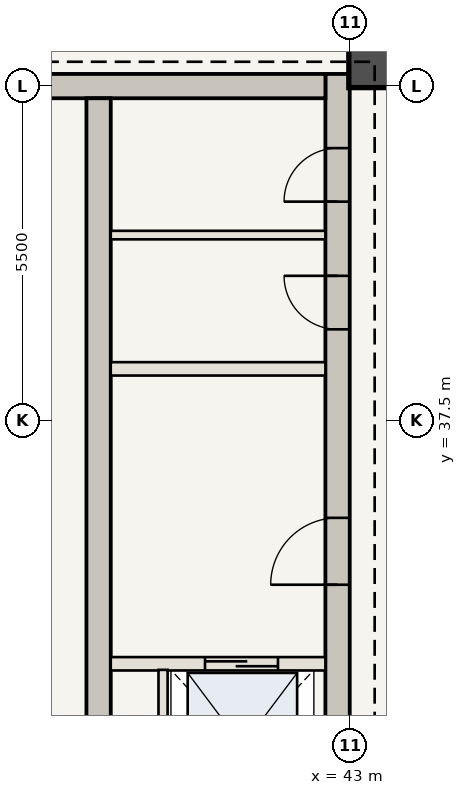
"""IFC4 building model, lengths in metres.
Left out: names, types, materials, properties, quantities, classifications, styles, units other than length and angle.
Written with IfcOpenShell. Run it as: python <this file> out.ifc"""

import sys

from ifc_helpers import new_model, si_unit, direction, frame, frame_2d, origin, origin_2d, place, context, subcontext, project, spatial, rectangle, extrude, element, fill, save


model = new_model("IFC4")
c1 = context("Model", 3, precision=1e-05, world=origin(), true_north=direction((0.0, 1.0)))
c2 = subcontext(c1, "Body", "Model", "MODEL_VIEW")
j1 = project(units=[si_unit("LENGTHUNIT", "METRE"), si_unit("PLANEANGLEUNIT", "RADIAN")], contexts=[c1])
p1 = place(None, origin())
s1 = spatial("IfcSite", under=j1, at=p1, CompositionType="ELEMENT")
p2 = place(p1, origin())
s2 = spatial("IfcBuilding", under=s1, at=p2, CompositionType="ELEMENT")
p3 = place(p2, frame((0.0, 0.0, 285.25)))
s3 = spatial("IfcBuildingStorey", under=s2, at=p3, CompositionType="ELEMENT", Elevation=285.25)
p4 = place(p3, frame((42.79, 30.6, 0.0), z_axis=(0.0, 0.0, 1.0), x_axis=(0.0, 1.0, 0.0)))
e1 = element("IfcWall", 1, at=p4, inside=s3, PredefinedType="SHEAR", context=c2, shape_type="SweptSolid", body=[
    extrude(rectangle(XDim=12.6, YDim=0.4, at=frame_2d((6.3, 0.0))), origin(), (0.0, 0.0, 1.0), 3.85),
])
p5 = place(p4, frame((4.2, 0.0, 0.0)))
e2 = element("IfcOpeningElement", 2, at=p5, cuts=e1, PredefinedType="OPENING", context=c2, shape_type="SweptSolid", body=[
    extrude(rectangle(XDim=1.1, YDim=2.15, at=frame_2d((0.55, 1.075))), frame((0.0, 0.21, 0.0), z_axis=(0.0, -1.0, 0.0), x_axis=(1.0, 0.0, 0.0)), (0.0, 0.0, 1.0), 0.42),
])
p6 = place(p4, frame((8.4, 0.0, 0.0)))
e3 = element("IfcOpeningElement", 3, at=p6, cuts=e1, PredefinedType="OPENING", context=c2, shape_type="SweptSolid", body=[
    extrude(rectangle(XDim=0.88, YDim=2.1, at=frame_2d((0.44, 1.05))), frame((0.0, 0.21, 0.0), z_axis=(0.0, -1.0, 0.0), x_axis=(1.0, 0.0, 0.0)), (0.0, 0.0, 1.0), 0.42),
])
p7 = place(p4, frame((10.5, 0.0, 0.0)))
e4 = element("IfcOpeningElement", 4, at=p7, cuts=e1, PredefinedType="OPENING", context=c2, shape_type="SweptSolid", body=[
    extrude(rectangle(XDim=0.88, YDim=2.1, at=frame_2d((0.44, 1.05))), frame((0.0, 0.21, 0.0), z_axis=(0.0, -1.0, 0.0), x_axis=(1.0, 0.0, 0.0)), (0.0, 0.0, 1.0), 0.42),
])
p8 = place(p3, frame((37.75, 43.0, 0.0), z_axis=(0.0, 0.0, 1.0), x_axis=(1.0, 0.0, 0.0)))
e5 = element("IfcWall", 5, at=p8, inside=s3, PredefinedType="SHEAR", context=c2, shape_type="SweptSolid", body=[
    extrude(rectangle(XDim=4.84, YDim=0.4, at=frame_2d((2.42, 0.0))), origin(), (0.0, 0.0, 1.0), 3.85),
])
p9 = place(p3, frame((38.86, 30.6, 0.0), z_axis=(0.0, 0.0, 1.0), x_axis=(0.0, 1.0, 0.0)))
e6 = element("IfcWall", 6, at=p9, inside=s3, PredefinedType="SHEAR", context=c2, shape_type="SweptSolid", body=[
    extrude(rectangle(XDim=12.2, YDim=0.4, at=frame_2d((6.1, 0.0))), origin(), (0.0, 0.0, 1.0), 3.85),
])
p10 = place(p3, frame((43.35, 43.35, 0.0), z_axis=(0.0, 0.0, 1.0), x_axis=(1.0, 0.0, 0.0)))
e7 = element("IfcColumn", 7, at=p10, inside=s3, PredefinedType="COLUMN", context=c2, shape_type="SweptSolid", body=[
    extrude(rectangle(XDim=0.75, YDim=0.75, at=origin_2d()), origin(), (0.0, 0.0, 1.0), 3.85),
])
p11 = place(p3, frame((39.06, 33.5, 0.0), z_axis=(0.0, 0.0, 1.0), x_axis=(1.0, 0.0, 0.0)))
e8 = element("IfcWall", 8, at=p11, inside=s3, PredefinedType="STANDARD", context=c2, shape_type="SweptSolid", body=[
    extrude(rectangle(XDim=3.53, YDim=0.22, at=frame_2d((1.765, 0.0))), origin(), (0.0, 0.0, 1.0), 3.685),
])
p12 = place(p11, frame((1.55, 0.0, 0.0)))
e9 = element("IfcOpeningElement", 9, at=p12, cuts=e8, PredefinedType="OPENING", context=c2, shape_type="SweptSolid", body=[
    extrude(rectangle(XDim=1.2, YDim=2.2, at=frame_2d((0.6, 1.1))), frame((0.0, 0.12, 0.0), z_axis=(0.0, -1.0, 0.0), x_axis=(1.0, 0.0, 0.0)), (0.0, 0.0, 1.0), 0.24),
])
p13 = place(p3, frame((39.92, 30.75, 0.0), z_axis=(0.0, 0.0, 1.0), x_axis=(0.0, 1.0, 0.0)))
e10 = element("IfcWall", 10, at=p13, inside=s3, PredefinedType="STANDARD", context=c2, shape_type="SweptSolid", body=[
    extrude(rectangle(XDim=2.65, YDim=0.15, at=frame_2d((1.325, 0.0))), origin(), (0.0, 0.0, 1.0), 3.685),
])
p14 = place(p3, frame((39.06, 38.35, 0.0), z_axis=(0.0, 0.0, 1.0), x_axis=(1.0, 0.0, 0.0)))
e11 = element("IfcWall", 11, at=p14, inside=s3, PredefinedType="STANDARD", context=c2, shape_type="SweptSolid", body=[
    extrude(rectangle(XDim=3.53, YDim=0.22, at=frame_2d((1.765, 0.0))), origin(), (0.0, 0.0, 1.0), 3.685),
])
p15 = place(p3, frame((39.06, 40.55, 0.0), z_axis=(0.0, 0.0, 1.0), x_axis=(1.0, 0.0, 0.0)))
e12 = element("IfcWall", 12, at=p15, inside=s3, PredefinedType="STANDARD", context=c2, shape_type="SweptSolid", body=[
    extrude(rectangle(XDim=3.53, YDim=0.14, at=frame_2d((1.765, 0.0))), origin(), (0.0, 0.0, 1.0), 3.685),
])
p16 = place(p5, origin())
e13 = element("IfcDoor", 13, at=p16, inside=s3, OperationType="SINGLE_SWING_LEFT", PredefinedType="DOOR", context=c2, shape_type="SweptSolid", body=[
    extrude(rectangle(XDim=1.1, YDim=2.15, at=frame_2d((0.55, 1.075))), frame((0.0, 0.025, 0.0), z_axis=(0.0, -1.0, 0.0), x_axis=(1.0, 0.0, 0.0)), (0.0, 0.0, 1.0), 0.05),
])
fill(e2, e13)
p17 = place(p6, origin())
e14 = element("IfcDoor", 14, at=p17, inside=s3, OperationType="SINGLE_SWING_RIGHT", PredefinedType="DOOR", context=c2, shape_type="SweptSolid", body=[
    extrude(rectangle(XDim=0.88, YDim=2.1, at=frame_2d((0.44, 1.05))), frame((0.0, 0.025, 0.0), z_axis=(0.0, -1.0, 0.0), x_axis=(1.0, 0.0, 0.0)), (0.0, 0.0, 1.0), 0.05),
])
fill(e3, e14)
p18 = place(p7, origin())
e15 = element("IfcDoor", 15, at=p18, inside=s3, OperationType="SINGLE_SWING_LEFT", PredefinedType="DOOR", context=c2, shape_type="SweptSolid", body=[
    extrude(rectangle(XDim=0.88, YDim=2.1, at=frame_2d((0.44, 1.05))), frame((0.0, 0.025, 0.0), z_axis=(0.0, -1.0, 0.0), x_axis=(1.0, 0.0, 0.0)), (0.0, 0.0, 1.0), 0.05),
])
fill(e4, e15)
p19 = place(p12, origin())
e16 = element("IfcDoor", 16, at=p19, inside=s3, OperationType="DOUBLE_DOOR_SLIDING", PredefinedType="DOOR", context=c2, shape_type="SweptSolid", body=[
    extrude(rectangle(XDim=1.2, YDim=2.2, at=frame_2d((0.6, 1.1))), frame((0.0, 0.025, 0.0), z_axis=(0.0, -1.0, 0.0), x_axis=(1.0, 0.0, 0.0)), (0.0, 0.0, 1.0), 0.05),
])
fill(e9, e16)
save(model, sys.argv[1])
